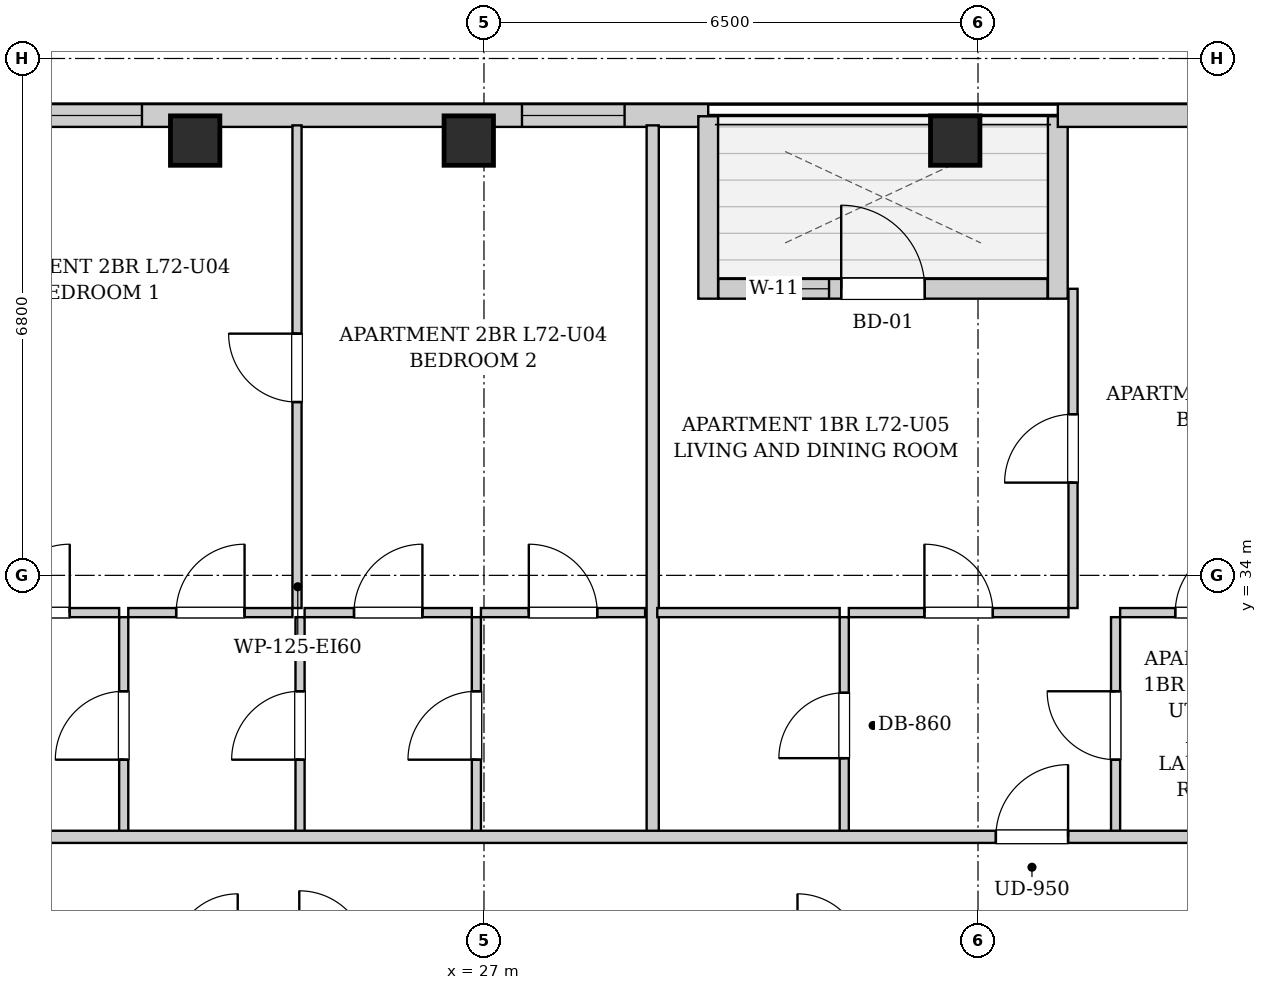
"""IFC4 building model, lengths in metres.
Left out: names, types, materials, properties, quantities, classifications, styles, units other than length and angle.
Written with IfcOpenShell. Run it as: python <this file> out.ifc"""

import sys

from ifc_helpers import new_model, si_unit, direction, frame, frame_2d, origin, origin_2d, place, context, subcontext, project, spatial, rectangle, extrude, element, fill, save


model = new_model("IFC4")
c1 = context("Model", 3, precision=1e-05, world=origin(), true_north=direction((0.0, 1.0)))
c2 = subcontext(c1, "Body", "Model", "MODEL_VIEW")
j1 = project(units=[si_unit("LENGTHUNIT", "METRE"), si_unit("PLANEANGLEUNIT", "RADIAN")], contexts=[c1])
p1 = place(None, origin())
s1 = spatial("IfcSite", under=j1, at=p1, CompositionType="ELEMENT")
p2 = place(p1, origin())
s2 = spatial("IfcBuilding", under=s1, at=p2, CompositionType="ELEMENT")
p3 = place(p2, frame((0.0, 0.0, 247.9)))
s3 = spatial("IfcBuildingStorey", under=s2, at=p3, CompositionType="ELEMENT", Elevation=247.9)
for number, where, z_axis, x_axis in (
    (1, (23.2, 39.72, 0.0), (0.0, 0.0, 1.0), (1.0, 0.0, 0.0)),
    (2, (26.8, 39.72, 0.0), (0.0, 0.0, 1.0), (1.0, 0.0, 0.0)),
    (3, (33.2, 39.72, 0.0), (0.0, 0.0, 1.0), (1.0, 0.0, 0.0)),
):
    element("IfcColumn", number, at=place(p3, frame(where, z_axis=z_axis, x_axis=x_axis)), inside=s3, PredefinedType="COLUMN", context=c2, shape_type="SweptSolid", body=[
        extrude(rectangle(XDim=0.65, YDim=0.65, at=origin_2d()), origin(), (0.0, 0.0, 1.0), 3.4),
    ])
p4 = place(p3, frame((19.7, 40.05, 0.0), z_axis=(0.0, 0.0, 1.0), x_axis=(1.0, 0.0, 0.0)))
e4 = element("IfcWall", 4, at=p4, inside=s3, PredefinedType="SOLIDWALL", context=c2, shape_type="SweptSolid", body=[
    extrude(rectangle(XDim=10.25, YDim=0.3, at=frame_2d((5.125, 0.0))), origin(), (0.0, 0.0, 1.0), 3.14),
])
p5 = place(p4, frame((1.45, 0.0, 0.55)))
e5 = element("IfcOpeningElement", 5, at=p5, cuts=e4, PredefinedType="OPENING", context=c2, shape_type="SweptSolid", body=[
    extrude(rectangle(XDim=1.35, YDim=1.2, at=frame_2d((0.675, 0.6))), frame((0.0, 0.16, 0.0), z_axis=(0.0, -1.0, 0.0), x_axis=(1.0, 0.0, 0.0)), (0.0, 0.0, 1.0), 0.32),
])
p6 = place(p4, frame((7.8, 0.0, 0.55)))
e6 = element("IfcOpeningElement", 6, at=p6, cuts=e4, PredefinedType="OPENING", context=c2, shape_type="SweptSolid", body=[
    extrude(rectangle(XDim=1.35, YDim=1.2, at=frame_2d((0.675, 0.6))), frame((0.0, 0.16, 0.0), z_axis=(0.0, -1.0, 0.0), x_axis=(1.0, 0.0, 0.0)), (0.0, 0.0, 1.0), 0.32),
])
p7 = place(p3, frame((29.95, 40.04, 0.0), z_axis=(0.0, 0.0, 1.0), x_axis=(0.0, -1.0, 0.0)))
e7 = element("IfcWall", 7, at=p7, inside=s3, PredefinedType="SOLIDWALL", context=c2, shape_type="SweptSolid", body=[
    extrude(rectangle(XDim=2.4, YDim=0.26, at=frame_2d((1.2, 0.0))), origin(), (0.0, 0.0, 1.0), 3.14),
])
p8 = place(p3, frame((30.084, 37.77, 0.0), z_axis=(0.0, 0.0, 1.0), x_axis=(1.0, 0.0, 0.0)))
e8 = element("IfcWall", 8, at=p8, inside=s3, PredefinedType="SOLIDWALL", context=c2, shape_type="SweptSolid", body=[
    extrude(rectangle(XDim=4.332, YDim=0.26, at=frame_2d((2.166, 0.0))), origin(), (0.0, 0.0, 1.0), 3.14),
])
p9 = place(p8, frame((1.616, 0.0, 0.0)))
e9 = element("IfcOpeningElement", 9, at=p9, cuts=e8, PredefinedType="OPENING", context=c2, shape_type="SweptSolid", body=[
    extrude(rectangle(XDim=1.1, YDim=2.0, at=frame_2d((0.55, 1.0))), frame((0.0, 0.14, 0.0), z_axis=(0.0, -1.0, 0.0), x_axis=(1.0, 0.0, 0.0)), (0.0, 0.0, 1.0), 0.28),
])
p10 = place(p8, frame((0.606, 0.0, 0.55)))
e10 = element("IfcOpeningElement", 10, at=p10, cuts=e8, PredefinedType="OPENING", context=c2, shape_type="SweptSolid", body=[
    extrude(rectangle(XDim=0.85, YDim=1.2, at=frame_2d((0.425, 0.6))), frame((0.0, 0.14, 0.0), z_axis=(0.0, -1.0, 0.0), x_axis=(1.0, 0.0, 0.0)), (0.0, 0.0, 1.0), 0.28),
])
p11 = place(p3, frame((34.55, 37.64, 0.0), z_axis=(0.0, 0.0, 1.0), x_axis=(0.0, 1.0, 0.0)))
e11 = element("IfcWall", 11, at=p11, inside=s3, PredefinedType="SOLIDWALL", context=c2, shape_type="SweptSolid", body=[
    extrude(rectangle(XDim=2.4, YDim=0.26, at=frame_2d((1.2, 0.0))), origin(), (0.0, 0.0, 1.0), 3.14),
])
p12 = place(p3, frame((34.55, 40.05, 0.0), z_axis=(0.0, 0.0, 1.0), x_axis=(1.0, 0.0, 0.0)))
e12 = element("IfcWall", 12, at=p12, inside=s3, PredefinedType="SOLIDWALL", context=c2, shape_type="SweptSolid", body=[
    extrude(rectangle(XDim=3.25, YDim=0.3, at=frame_2d((1.625, 0.0))), origin(), (0.0, 0.0, 1.0), 3.14),
])
p13 = place(p3, frame((22.26, 30.6, 0.0), z_axis=(0.0, 0.0, 1.0), x_axis=(0.0, 1.0, 0.0)))
e13 = element("IfcWall", 13, at=p13, inside=s3, PredefinedType="PARTITIONING", context=c2, shape_type="SweptSolid", body=[
    extrude(rectangle(XDim=2.85, YDim=0.12, at=frame_2d((1.425, 0.0))), origin(), (0.0, 0.0, 1.0), 3.14),
])
p14 = place(p13, frame((0.975, 0.0, 0.0)))
e14 = element("IfcOpeningElement", 14, at=p14, cuts=e13, PredefinedType="OPENING", context=c2, shape_type="SweptSolid", body=[
    extrude(rectangle(XDim=0.9, YDim=2.05, at=frame_2d((0.45, 1.025))), frame((0.0, 0.07, 0.0), z_axis=(0.0, -1.0, 0.0), x_axis=(1.0, 0.0, 0.0)), (0.0, 0.0, 1.0), 0.14),
])
p15 = place(p3, frame((20.0, 33.51, 0.0), z_axis=(0.0, 0.0, 1.0), x_axis=(1.0, 0.0, 0.0)))
e15 = element("IfcWall", 15, at=p15, inside=s3, PredefinedType="PARTITIONING", context=c2, shape_type="SweptSolid", body=[
    extrude(rectangle(XDim=2.2, YDim=0.12, at=frame_2d((1.1, 0.0))), origin(), (0.0, 0.0, 1.0), 3.14),
])
p16 = place(p15, frame((0.65, 0.0, 0.0)))
e16 = element("IfcOpeningElement", 16, at=p16, cuts=e15, PredefinedType="OPENING", context=c2, shape_type="SweptSolid", body=[
    extrude(rectangle(XDim=0.9, YDim=2.05, at=frame_2d((0.45, 1.025))), frame((0.0, 0.07, 0.0), z_axis=(0.0, -1.0, 0.0), x_axis=(1.0, 0.0, 0.0)), (0.0, 0.0, 1.0), 0.14),
])
p17 = place(p3, frame((24.58, 30.6, 0.0), z_axis=(0.0, 0.0, 1.0), x_axis=(0.0, 1.0, 0.0)))
e17 = element("IfcWall", 17, at=p17, inside=s3, PredefinedType="PARTITIONING", context=c2, shape_type="SweptSolid", body=[
    extrude(rectangle(XDim=2.85, YDim=0.12, at=frame_2d((1.425, 0.0))), origin(), (0.0, 0.0, 1.0), 3.14),
])
p18 = place(p17, frame((0.975, 0.0, 0.0)))
e18 = element("IfcOpeningElement", 18, at=p18, cuts=e17, PredefinedType="OPENING", context=c2, shape_type="SweptSolid", body=[
    extrude(rectangle(XDim=0.9, YDim=2.05, at=frame_2d((0.45, 1.025))), frame((0.0, 0.07, 0.0), z_axis=(0.0, -1.0, 0.0), x_axis=(1.0, 0.0, 0.0)), (0.0, 0.0, 1.0), 0.14),
])
p19 = place(p3, frame((22.32, 33.51, 0.0), z_axis=(0.0, 0.0, 1.0), x_axis=(1.0, 0.0, 0.0)))
e19 = element("IfcWall", 19, at=p19, inside=s3, PredefinedType="PARTITIONING", context=c2, shape_type="SweptSolid", body=[
    extrude(rectangle(XDim=2.16, YDim=0.12, at=frame_2d((1.08, 0.0))), origin(), (0.0, 0.0, 1.0), 3.14),
])
p20 = place(p19, frame((0.63, 0.0, 0.0)))
e20 = element("IfcOpeningElement", 20, at=p20, cuts=e19, PredefinedType="OPENING", context=c2, shape_type="SweptSolid", body=[
    extrude(rectangle(XDim=0.9, YDim=2.05, at=frame_2d((0.45, 1.025))), frame((0.0, 0.07, 0.0), z_axis=(0.0, -1.0, 0.0), x_axis=(1.0, 0.0, 0.0)), (0.0, 0.0, 1.0), 0.14),
])
p21 = place(p3, frame((26.9, 30.6, 0.0), z_axis=(0.0, 0.0, 1.0), x_axis=(0.0, 1.0, 0.0)))
e21 = element("IfcWall", 21, at=p21, inside=s3, PredefinedType="PARTITIONING", context=c2, shape_type="SweptSolid", body=[
    extrude(rectangle(XDim=2.85, YDim=0.12, at=frame_2d((1.425, 0.0))), origin(), (0.0, 0.0, 1.0), 3.14),
])
p22 = place(p21, frame((0.975, 0.0, 0.0)))
e22 = element("IfcOpeningElement", 22, at=p22, cuts=e21, PredefinedType="OPENING", context=c2, shape_type="SweptSolid", body=[
    extrude(rectangle(XDim=0.9, YDim=2.05, at=frame_2d((0.45, 1.025))), frame((0.0, 0.07, 0.0), z_axis=(0.0, -1.0, 0.0), x_axis=(1.0, 0.0, 0.0)), (0.0, 0.0, 1.0), 0.14),
])
p23 = place(p3, frame((24.64, 33.51, 0.0), z_axis=(0.0, 0.0, 1.0), x_axis=(1.0, 0.0, 0.0)))
e23 = element("IfcWall", 23, at=p23, inside=s3, PredefinedType="PARTITIONING", context=c2, shape_type="SweptSolid", body=[
    extrude(rectangle(XDim=2.2, YDim=0.12, at=frame_2d((1.1, 0.0))), origin(), (0.0, 0.0, 1.0), 3.14),
])
p24 = place(p23, frame((0.65, 0.0, 0.0)))
e24 = element("IfcOpeningElement", 24, at=p24, cuts=e23, PredefinedType="OPENING", context=c2, shape_type="SweptSolid", body=[
    extrude(rectangle(XDim=0.9, YDim=2.05, at=frame_2d((0.45, 1.025))), frame((0.0, 0.07, 0.0), z_axis=(0.0, -1.0, 0.0), x_axis=(1.0, 0.0, 0.0)), (0.0, 0.0, 1.0), 0.14),
])
p25 = place(p3, frame((26.96, 33.51, 0.0), z_axis=(0.0, 0.0, 1.0), x_axis=(1.0, 0.0, 0.0)))
e25 = element("IfcWall", 25, at=p25, inside=s3, PredefinedType="PARTITIONING", context=c2, shape_type="SweptSolid", body=[
    extrude(rectangle(XDim=2.16, YDim=0.12, at=frame_2d((1.08, 0.0))), origin(), (0.0, 0.0, 1.0), 3.14),
])
p26 = place(p25, frame((0.63, 0.0, 0.0)))
e26 = element("IfcOpeningElement", 26, at=p26, cuts=e25, PredefinedType="OPENING", context=c2, shape_type="SweptSolid", body=[
    extrude(rectangle(XDim=0.9, YDim=2.05, at=frame_2d((0.45, 1.025))), frame((0.0, 0.07, 0.0), z_axis=(0.0, -1.0, 0.0), x_axis=(1.0, 0.0, 0.0)), (0.0, 0.0, 1.0), 0.14),
])
p27 = place(p3, frame((24.54, 33.57, 0.0), z_axis=(0.0, 0.0, 1.0), x_axis=(0.0, 1.0, 0.0)))
e27 = element("IfcWall", 27, at=p27, inside=s3, PredefinedType="PARTITIONING", context=c2, shape_type="SweptSolid", body=[
    extrude(rectangle(XDim=6.35, YDim=0.12, at=frame_2d((3.175, 0.0))), origin(), (0.0, 0.0, 1.0), 3.14),
])
p28 = place(p27, frame((2.71, 0.0, 0.0)))
e28 = element("IfcOpeningElement", 28, at=p28, cuts=e27, PredefinedType="OPENING", context=c2, shape_type="SweptSolid", body=[
    extrude(rectangle(XDim=0.9, YDim=2.05, at=frame_2d((0.45, 1.025))), frame((0.0, 0.07, 0.0), z_axis=(0.0, -1.0, 0.0), x_axis=(1.0, 0.0, 0.0)), (0.0, 0.0, 1.0), 0.14),
])
p29 = place(p3, frame((29.22, 30.6, 0.0), z_axis=(0.0, 0.0, 1.0), x_axis=(0.0, 1.0, 0.0)))
e29 = element("IfcWall", 29, at=p29, inside=s3, PredefinedType="PARTITIONING", context=c2, shape_type="SweptSolid", body=[
    extrude(rectangle(XDim=9.32, YDim=0.16, at=frame_2d((4.66, 0.0))), origin(), (0.0, 0.0, 1.0), 3.14),
])
p30 = place(p3, frame((31.74, 30.6, 0.0), z_axis=(0.0, 0.0, 1.0), x_axis=(0.0, 1.0, 0.0)))
e30 = element("IfcWall", 30, at=p30, inside=s3, PredefinedType="PARTITIONING", context=c2, shape_type="SweptSolid", body=[
    extrude(rectangle(XDim=2.85, YDim=0.12, at=frame_2d((1.425, 0.0))), origin(), (0.0, 0.0, 1.0), 3.14),
])
p31 = place(p30, frame((0.995, 0.0, 0.0)))
e31 = element("IfcOpeningElement", 31, at=p31, cuts=e30, PredefinedType="OPENING", context=c2, shape_type="SweptSolid", body=[
    extrude(rectangle(XDim=0.86, YDim=2.05, at=frame_2d((0.43, 1.025))), frame((0.0, 0.07, 0.0), z_axis=(0.0, -1.0, 0.0), x_axis=(1.0, 0.0, 0.0)), (0.0, 0.0, 1.0), 0.14),
])
p32 = place(p3, frame((29.28, 33.51, 0.0), z_axis=(0.0, 0.0, 1.0), x_axis=(1.0, 0.0, 0.0)))
e32 = element("IfcWall", 32, at=p32, inside=s3, PredefinedType="PARTITIONING", context=c2, shape_type="SweptSolid", body=[
    extrude(rectangle(XDim=2.4, YDim=0.12, at=frame_2d((1.2, 0.0))), origin(), (0.0, 0.0, 1.0), 3.14),
])
p33 = place(p3, frame((35.31, 30.6, 0.0), z_axis=(0.0, 0.0, 1.0), x_axis=(0.0, 1.0, 0.0)))
e33 = element("IfcWall", 33, at=p33, inside=s3, PredefinedType="PARTITIONING", context=c2, shape_type="SweptSolid", body=[
    extrude(rectangle(XDim=2.85, YDim=0.12, at=frame_2d((1.425, 0.0))), origin(), (0.0, 0.0, 1.0), 3.14),
])
p34 = place(p33, frame((0.975, 0.0, 0.0)))
e34 = element("IfcOpeningElement", 34, at=p34, cuts=e33, PredefinedType="OPENING", context=c2, shape_type="SweptSolid", body=[
    extrude(rectangle(XDim=0.9, YDim=2.05, at=frame_2d((0.45, 1.025))), frame((0.0, 0.07, 0.0), z_axis=(0.0, -1.0, 0.0), x_axis=(1.0, 0.0, 0.0)), (0.0, 0.0, 1.0), 0.14),
])
p35 = place(p3, frame((31.8, 33.51, 0.0), z_axis=(0.0, 0.0, 1.0), x_axis=(1.0, 0.0, 0.0)))
e35 = element("IfcWall", 35, at=p35, inside=s3, PredefinedType="PARTITIONING", context=c2, shape_type="SweptSolid", body=[
    extrude(rectangle(XDim=2.89, YDim=0.12, at=frame_2d((1.445, 0.0))), origin(), (0.0, 0.0, 1.0), 3.14),
])
p36 = place(p35, frame((0.995, 0.0, 0.0)))
e36 = element("IfcOpeningElement", 36, at=p36, cuts=e35, PredefinedType="OPENING", context=c2, shape_type="SweptSolid", body=[
    extrude(rectangle(XDim=0.9, YDim=2.05, at=frame_2d((0.45, 1.025))), frame((0.0, 0.07, 0.0), z_axis=(0.0, -1.0, 0.0), x_axis=(1.0, 0.0, 0.0)), (0.0, 0.0, 1.0), 0.14),
])
p37 = place(p3, frame((35.37, 33.51, 0.0), z_axis=(0.0, 0.0, 1.0), x_axis=(1.0, 0.0, 0.0)))
e37 = element("IfcWall", 37, at=p37, inside=s3, PredefinedType="PARTITIONING", context=c2, shape_type="SweptSolid", body=[
    extrude(rectangle(XDim=2.35, YDim=0.12, at=frame_2d((1.175, 0.0))), origin(), (0.0, 0.0, 1.0), 3.14),
])
p38 = place(p37, frame((0.725, 0.0, 0.0)))
e38 = element("IfcOpeningElement", 38, at=p38, cuts=e37, PredefinedType="OPENING", context=c2, shape_type="SweptSolid", body=[
    extrude(rectangle(XDim=0.9, YDim=2.05, at=frame_2d((0.45, 1.025))), frame((0.0, 0.07, 0.0), z_axis=(0.0, -1.0, 0.0), x_axis=(1.0, 0.0, 0.0)), (0.0, 0.0, 1.0), 0.14),
])
p39 = place(p3, frame((34.75, 33.57, 0.0), z_axis=(0.0, 0.0, 1.0), x_axis=(0.0, 1.0, 0.0)))
e39 = element("IfcWall", 39, at=p39, inside=s3, PredefinedType="PARTITIONING", context=c2, shape_type="SweptSolid", body=[
    extrude(rectangle(XDim=4.2, YDim=0.12, at=frame_2d((2.1, 0.0))), origin(), (0.0, 0.0, 1.0), 3.14),
])
p40 = place(p39, frame((1.65, 0.0, 0.0)))
e40 = element("IfcOpeningElement", 40, at=p40, cuts=e39, PredefinedType="OPENING", context=c2, shape_type="SweptSolid", body=[
    extrude(rectangle(XDim=0.9, YDim=2.05, at=frame_2d((0.45, 1.025))), frame((0.0, 0.07, 0.0), z_axis=(0.0, -1.0, 0.0), x_axis=(1.0, 0.0, 0.0)), (0.0, 0.0, 1.0), 0.14),
])
p41 = place(p3, frame((13.15, 30.56, 0.0), z_axis=(0.0, 0.0, 1.0), x_axis=(1.0, 0.0, 0.0)))
e41 = element("IfcWall", 41, at=p41, inside=s3, PredefinedType="PARTITIONING", context=c2, shape_type="SweptSolid", body=[
    extrude(rectangle(XDim=24.6, YDim=0.16, at=frame_2d((12.3, 0.0))), origin(), (0.0, 0.0, 1.0), 3.14),
])
p42 = place(p41, frame((3.165, 0.0, 0.0)))
e42 = element("IfcOpeningElement", 42, at=p42, cuts=e41, PredefinedType="OPENING", context=c2, shape_type="SweptSolid", body=[
    extrude(rectangle(XDim=0.95, YDim=2.1, at=frame_2d((0.475, 1.05))), frame((0.0, 0.09, 0.0), z_axis=(0.0, -1.0, 0.0), x_axis=(1.0, 0.0, 0.0)), (0.0, 0.0, 1.0), 0.18),
])
p43 = place(p41, frame((20.585, 0.0, 0.0)))
e43 = element("IfcOpeningElement", 43, at=p43, cuts=e41, PredefinedType="OPENING", context=c2, shape_type="SweptSolid", body=[
    extrude(rectangle(XDim=0.95, YDim=2.1, at=frame_2d((0.475, 1.05))), frame((0.0, 0.09, 0.0), z_axis=(0.0, -1.0, 0.0), x_axis=(1.0, 0.0, 0.0)), (0.0, 0.0, 1.0), 0.18),
])
p44 = place(p14, origin())
e44 = element("IfcDoor", 44, at=p44, inside=s3, OperationType="SINGLE_SWING_LEFT", PredefinedType="DOOR", context=c2, shape_type="SweptSolid", body=[
    extrude(rectangle(XDim=0.9, YDim=2.05, at=frame_2d((0.45, 1.025))), frame((0.0, 0.025, 0.0), z_axis=(0.0, -1.0, 0.0), x_axis=(1.0, 0.0, 0.0)), (0.0, 0.0, 1.0), 0.05),
])
fill(e14, e44)
p45 = place(p16, origin())
e45 = element("IfcDoor", 45, at=p45, inside=s3, OperationType="SINGLE_SWING_RIGHT", PredefinedType="DOOR", context=c2, shape_type="SweptSolid", body=[
    extrude(rectangle(XDim=0.9, YDim=2.05, at=frame_2d((0.45, 1.025))), frame((0.0, 0.025, 0.0), z_axis=(0.0, -1.0, 0.0), x_axis=(1.0, 0.0, 0.0)), (0.0, 0.0, 1.0), 0.05),
])
fill(e16, e45)
p46 = place(p18, origin())
e46 = element("IfcDoor", 46, at=p46, inside=s3, OperationType="SINGLE_SWING_LEFT", PredefinedType="DOOR", context=c2, shape_type="SweptSolid", body=[
    extrude(rectangle(XDim=0.9, YDim=2.05, at=frame_2d((0.45, 1.025))), frame((0.0, 0.025, 0.0), z_axis=(0.0, -1.0, 0.0), x_axis=(1.0, 0.0, 0.0)), (0.0, 0.0, 1.0), 0.05),
])
fill(e18, e46)
p47 = place(p20, origin())
e47 = element("IfcDoor", 47, at=p47, inside=s3, OperationType="SINGLE_SWING_RIGHT", PredefinedType="DOOR", context=c2, shape_type="SweptSolid", body=[
    extrude(rectangle(XDim=0.9, YDim=2.05, at=frame_2d((0.45, 1.025))), frame((0.0, 0.025, 0.0), z_axis=(0.0, -1.0, 0.0), x_axis=(1.0, 0.0, 0.0)), (0.0, 0.0, 1.0), 0.05),
])
fill(e20, e47)
p48 = place(p22, origin())
e48 = element("IfcDoor", 48, at=p48, inside=s3, OperationType="SINGLE_SWING_LEFT", PredefinedType="DOOR", context=c2, shape_type="SweptSolid", body=[
    extrude(rectangle(XDim=0.9, YDim=2.05, at=frame_2d((0.45, 1.025))), frame((0.0, 0.025, 0.0), z_axis=(0.0, -1.0, 0.0), x_axis=(1.0, 0.0, 0.0)), (0.0, 0.0, 1.0), 0.05),
])
fill(e22, e48)
p49 = place(p24, origin())
e49 = element("IfcDoor", 49, at=p49, inside=s3, OperationType="SINGLE_SWING_RIGHT", PredefinedType="DOOR", context=c2, shape_type="SweptSolid", body=[
    extrude(rectangle(XDim=0.9, YDim=2.05, at=frame_2d((0.45, 1.025))), frame((0.0, 0.025, 0.0), z_axis=(0.0, -1.0, 0.0), x_axis=(1.0, 0.0, 0.0)), (0.0, 0.0, 1.0), 0.05),
])
fill(e24, e49)
p50 = place(p26, origin())
e50 = element("IfcDoor", 50, at=p50, inside=s3, OperationType="SINGLE_SWING_LEFT", PredefinedType="DOOR", context=c2, shape_type="SweptSolid", body=[
    extrude(rectangle(XDim=0.9, YDim=2.05, at=frame_2d((0.45, 1.025))), frame((0.0, 0.025, 0.0), z_axis=(0.0, -1.0, 0.0), x_axis=(1.0, 0.0, 0.0)), (0.0, 0.0, 1.0), 0.05),
])
fill(e26, e50)
p51 = place(p28, origin())
e51 = element("IfcDoor", 51, at=p51, inside=s3, OperationType="SINGLE_SWING_RIGHT", PredefinedType="DOOR", context=c2, shape_type="SweptSolid", body=[
    extrude(rectangle(XDim=0.9, YDim=2.05, at=frame_2d((0.45, 1.025))), frame((0.0, 0.025, 0.0), z_axis=(0.0, -1.0, 0.0), x_axis=(1.0, 0.0, 0.0)), (0.0, 0.0, 1.0), 0.05),
])
fill(e28, e51)
p52 = place(p31, origin())
e52 = element("IfcDoor", 52, at=p52, inside=s3, OperationType="SINGLE_SWING_LEFT", PredefinedType="DOOR", context=c2, shape_type="SweptSolid", body=[
    extrude(rectangle(XDim=0.86, YDim=2.05, at=frame_2d((0.43, 1.025))), frame((0.0, 0.025, 0.0), z_axis=(0.0, -1.0, 0.0), x_axis=(1.0, 0.0, 0.0)), (0.0, 0.0, 1.0), 0.05),
])
fill(e31, e52)
p53 = place(p34, origin())
e53 = element("IfcDoor", 53, at=p53, inside=s3, OperationType="SINGLE_SWING_RIGHT", PredefinedType="DOOR", context=c2, shape_type="SweptSolid", body=[
    extrude(rectangle(XDim=0.9, YDim=2.05, at=frame_2d((0.45, 1.025))), frame((0.0, 0.025, 0.0), z_axis=(0.0, -1.0, 0.0), x_axis=(1.0, 0.0, 0.0)), (0.0, 0.0, 1.0), 0.05),
])
fill(e34, e53)
p54 = place(p36, origin())
e54 = element("IfcDoor", 54, at=p54, inside=s3, OperationType="SINGLE_SWING_LEFT", PredefinedType="DOOR", context=c2, shape_type="SweptSolid", body=[
    extrude(rectangle(XDim=0.9, YDim=2.05, at=frame_2d((0.45, 1.025))), frame((0.0, 0.025, 0.0), z_axis=(0.0, -1.0, 0.0), x_axis=(1.0, 0.0, 0.0)), (0.0, 0.0, 1.0), 0.05),
])
fill(e36, e54)
p55 = place(p38, origin())
e55 = element("IfcDoor", 55, at=p55, inside=s3, OperationType="SINGLE_SWING_RIGHT", PredefinedType="DOOR", context=c2, shape_type="SweptSolid", body=[
    extrude(rectangle(XDim=0.9, YDim=2.05, at=frame_2d((0.45, 1.025))), frame((0.0, 0.025, 0.0), z_axis=(0.0, -1.0, 0.0), x_axis=(1.0, 0.0, 0.0)), (0.0, 0.0, 1.0), 0.05),
])
fill(e38, e55)
p56 = place(p40, origin())
e56 = element("IfcDoor", 56, at=p56, inside=s3, OperationType="SINGLE_SWING_LEFT", PredefinedType="DOOR", context=c2, shape_type="SweptSolid", body=[
    extrude(rectangle(XDim=0.9, YDim=2.05, at=frame_2d((0.45, 1.025))), frame((0.0, 0.025, 0.0), z_axis=(0.0, -1.0, 0.0), x_axis=(1.0, 0.0, 0.0)), (0.0, 0.0, 1.0), 0.05),
])
fill(e40, e56)
p57 = place(p43, origin())
e57 = element("IfcDoor", 57, at=p57, inside=s3, OperationType="SINGLE_SWING_RIGHT", PredefinedType="DOOR", context=c2, shape_type="SweptSolid", body=[
    extrude(rectangle(XDim=0.95, YDim=2.1, at=frame_2d((0.475, 1.05))), frame((0.0, 0.025, 0.0), z_axis=(0.0, -1.0, 0.0), x_axis=(1.0, 0.0, 0.0)), (0.0, 0.0, 1.0), 0.05),
])
fill(e43, e57)
p58 = place(p9, origin())
e58 = element("IfcDoor", 58, at=p58, inside=s3, OperationType="SINGLE_SWING_LEFT", PredefinedType="DOOR", context=c2, shape_type="SweptSolid", body=[
    extrude(rectangle(XDim=1.1, YDim=2.0, at=frame_2d((0.55, 1.0))), frame((0.0, 0.025, 0.0), z_axis=(0.0, -1.0, 0.0), x_axis=(1.0, 0.0, 0.0)), (0.0, 0.0, 1.0), 0.05),
])
fill(e9, e58)
p59 = place(p5, origin())
e59 = element("IfcWindow", 59, at=p59, inside=s3, PartitioningType="SINGLE_PANEL", PredefinedType="WINDOW", context=c2, shape_type="SweptSolid", body=[
    extrude(rectangle(XDim=1.35, YDim=1.2, at=frame_2d((0.675, 0.6))), frame((0.0, 0.03, 0.0), z_axis=(0.0, -1.0, 0.0), x_axis=(1.0, 0.0, 0.0)), (0.0, 0.0, 1.0), 0.06),
])
fill(e5, e59)
p60 = place(p6, origin())
e60 = element("IfcWindow", 60, at=p60, inside=s3, PartitioningType="SINGLE_PANEL", PredefinedType="WINDOW", context=c2, shape_type="SweptSolid", body=[
    extrude(rectangle(XDim=1.35, YDim=1.2, at=frame_2d((0.675, 0.6))), frame((0.0, 0.03, 0.0), z_axis=(0.0, -1.0, 0.0), x_axis=(1.0, 0.0, 0.0)), (0.0, 0.0, 1.0), 0.06),
])
fill(e6, e60)
p61 = place(p10, origin())
e61 = element("IfcWindow", 61, at=p61, inside=s3, PartitioningType="SINGLE_PANEL", PredefinedType="WINDOW", context=c2, shape_type="SweptSolid", body=[
    extrude(rectangle(XDim=0.85, YDim=1.2, at=frame_2d((0.425, 0.6))), frame((0.0, 0.03, 0.0), z_axis=(0.0, -1.0, 0.0), x_axis=(1.0, 0.0, 0.0)), (0.0, 0.0, 1.0), 0.06),
])
fill(e10, e61)
save(model, sys.argv[1])
